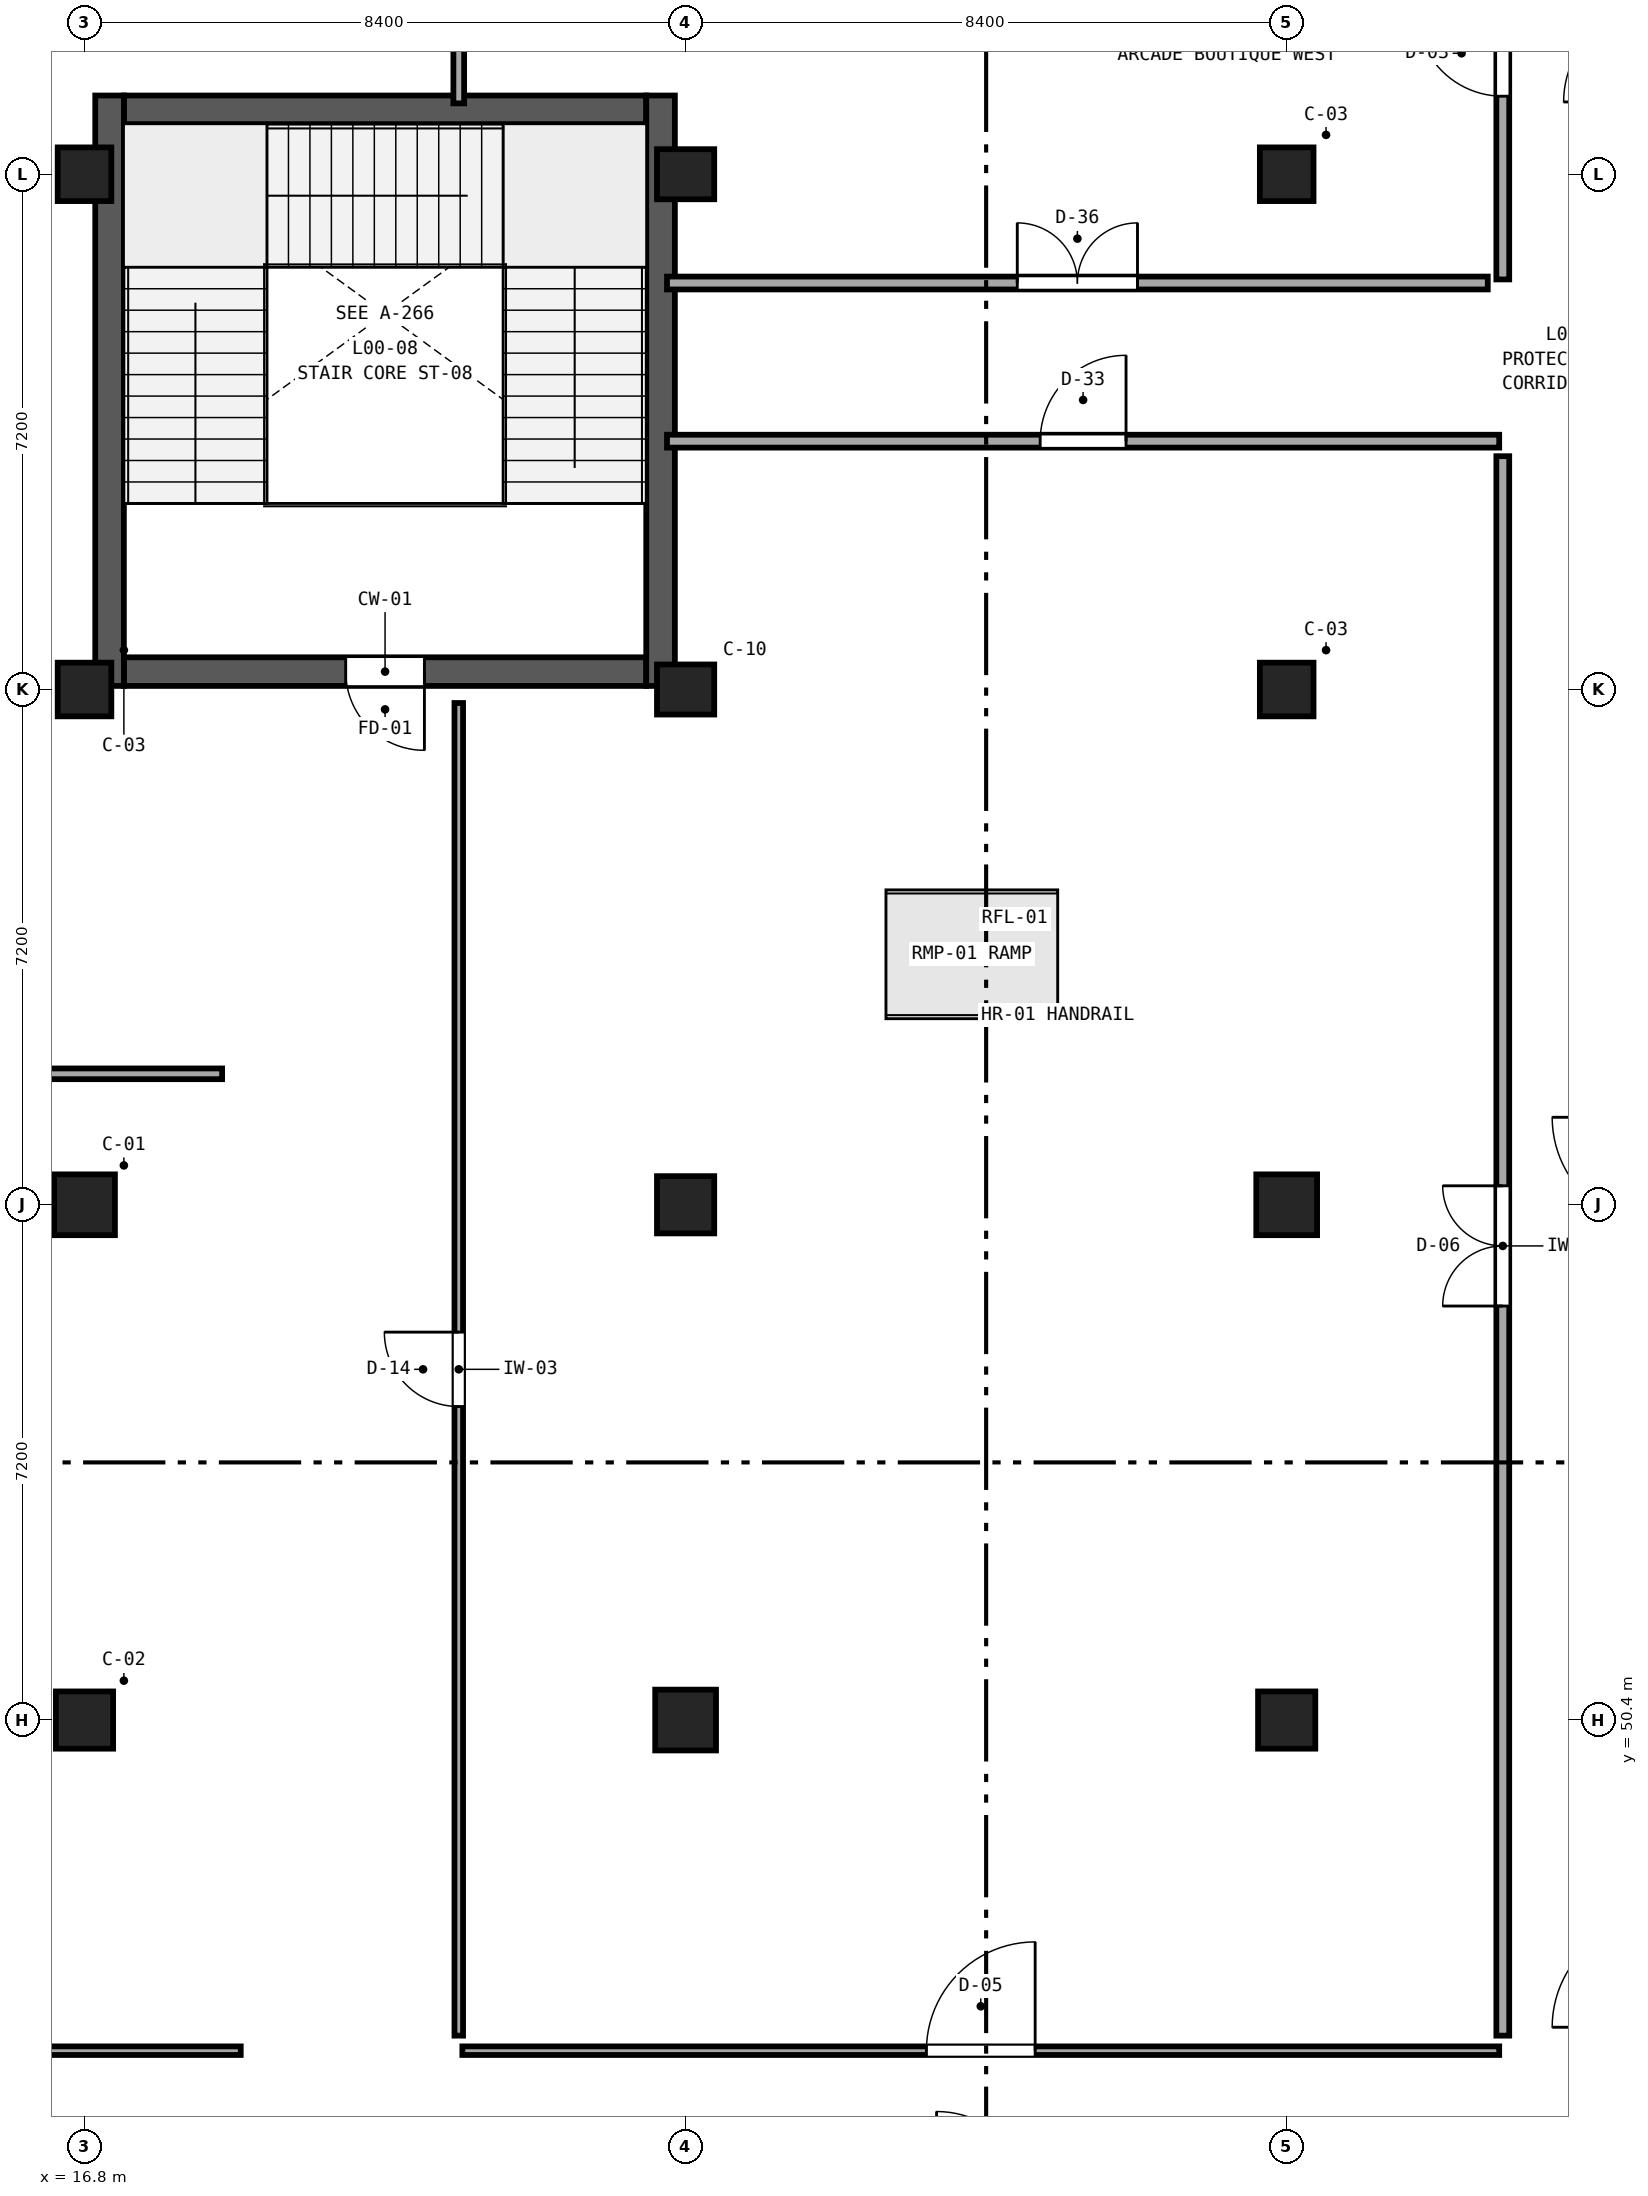
"""IFC4 building model, lengths in metres.
Left out: names, types, materials, properties, quantities, classifications, styles, units other than length and angle.
Written with IfcOpenShell. Run it as: python <this file> out.ifc"""

import sys

from ifc_helpers import new_model, si_unit, direction, frame, frame_2d, origin, origin_2d, place, context, subcontext, project, spatial, rectangle, extrude, element, fill, save


model = new_model("IFC4")
c1 = context("Model", 3, precision=1e-05, world=origin(), true_north=direction((0.0, 1.0)))
c2 = subcontext(c1, "Body", "Model", "MODEL_VIEW")
j1 = project(units=[si_unit("LENGTHUNIT", "METRE"), si_unit("PLANEANGLEUNIT", "RADIAN")], contexts=[c1])
p1 = place(None, origin())
s1 = spatial("IfcSite", under=j1, at=p1, CompositionType="ELEMENT")
p2 = place(p1, origin())
s2 = spatial("IfcBuilding", under=s1, at=p2, CompositionType="ELEMENT")
p3 = place(p2, origin())
s3 = spatial("IfcBuildingStorey", under=s2, at=p3, CompositionType="ELEMENT", Elevation=0.0)
p4 = place(p3, frame((16.8, 50.4, 0.0), z_axis=(0.0, 0.0, 1.0), x_axis=(1.0, 0.0, 0.0)))
e1 = element("IfcColumn", 1, at=p4, inside=s3, PredefinedType="COLUMN", context=c2, shape_type="SweptSolid", body=[
    extrude(rectangle(XDim=0.8, YDim=0.8, at=origin_2d()), origin(), (0.0, 0.0, 1.0), 5.4),
])
p5 = place(p3, frame((16.8, 57.6, 0.0), z_axis=(0.0, 0.0, 1.0), x_axis=(1.0, 0.0, 0.0)))
e2 = element("IfcColumn", 2, at=p5, inside=s3, PredefinedType="COLUMN", context=c2, shape_type="SweptSolid", body=[
    extrude(rectangle(XDim=0.85, YDim=0.85, at=origin_2d()), origin(), (0.0, 0.0, 1.0), 5.4),
])
for number, where, z_axis, x_axis in (
    (3, (16.8, 64.8, 0.0), (0.0, 0.0, 1.0), (1.0, 0.0, 0.0)),
    (4, (16.8, 72.0, 0.0), (0.0, 0.0, 1.0), (1.0, 0.0, 0.0)),
):
    element("IfcColumn", number, at=place(p3, frame(where, z_axis=z_axis, x_axis=x_axis)), inside=s3, PredefinedType="COLUMN", context=c2, shape_type="SweptSolid", body=[
        extrude(rectangle(XDim=0.75, YDim=0.75, at=origin_2d()), origin(), (0.0, 0.0, 1.0), 5.4),
    ])
p6 = place(p3, frame((25.2, 50.4, 0.0), z_axis=(0.0, 0.0, 1.0), x_axis=(1.0, 0.0, 0.0)))
e5 = element("IfcColumn", 5, at=p6, inside=s3, PredefinedType="COLUMN", context=c2, shape_type="SweptSolid", body=[
    extrude(rectangle(XDim=0.85, YDim=0.85, at=origin_2d()), origin(), (0.0, 0.0, 1.0), 5.4),
])
p7 = place(p3, frame((25.2, 57.6, 0.0), z_axis=(0.0, 0.0, 1.0), x_axis=(1.0, 0.0, 0.0)))
e6 = element("IfcColumn", 6, at=p7, inside=s3, PredefinedType="COLUMN", context=c2, shape_type="SweptSolid", body=[
    extrude(rectangle(XDim=0.8, YDim=0.8, at=origin_2d()), origin(), (0.0, 0.0, 1.0), 5.4),
])
for number, where, z_axis, x_axis in (
    (7, (25.2, 64.8, 0.0), (0.0, 0.0, 1.0), (1.0, 0.0, 0.0)),
    (8, (25.2, 72.0, 0.0), (0.0, 0.0, 1.0), (1.0, 0.0, 0.0)),
):
    element("IfcColumn", number, at=place(p3, frame(where, z_axis=z_axis, x_axis=x_axis)), inside=s3, PredefinedType="COLUMN", context=c2, shape_type="SweptSolid", body=[
        extrude(rectangle(XDim=0.8, YDim=0.7, at=origin_2d()), origin(), (0.0, 0.0, 1.0), 5.4),
    ])
p8 = place(p3, frame((33.6, 50.4, 0.0), z_axis=(0.0, 0.0, 1.0), x_axis=(1.0, 0.0, 0.0)))
e9 = element("IfcColumn", 9, at=p8, inside=s3, PredefinedType="COLUMN", context=c2, shape_type="SweptSolid", body=[
    extrude(rectangle(XDim=0.8, YDim=0.8, at=origin_2d()), origin(), (0.0, 0.0, 1.0), 5.4),
])
p9 = place(p3, frame((33.6, 57.6, 0.0), z_axis=(0.0, 0.0, 1.0), x_axis=(1.0, 0.0, 0.0)))
e10 = element("IfcColumn", 10, at=p9, inside=s3, PredefinedType="COLUMN", context=c2, shape_type="SweptSolid", body=[
    extrude(rectangle(XDim=0.85, YDim=0.85, at=origin_2d()), origin(), (0.0, 0.0, 1.0), 5.4),
])
for number, where, z_axis, x_axis in (
    (11, (33.6, 64.8, 0.0), (0.0, 0.0, 1.0), (1.0, 0.0, 0.0)),
    (12, (33.6, 72.0, 0.0), (0.0, 0.0, 1.0), (1.0, 0.0, 0.0)),
):
    element("IfcColumn", number, at=place(p3, frame(where, z_axis=z_axis, x_axis=x_axis)), inside=s3, PredefinedType="COLUMN", context=c2, shape_type="SweptSolid", body=[
        extrude(rectangle(XDim=0.75, YDim=0.75, at=origin_2d()), origin(), (0.0, 0.0, 1.0), 5.4),
    ])
p10 = place(p3, frame((24.65, 65.05, 0.0), z_axis=(0.0, 0.0, 1.0), x_axis=(-1.0, 0.0, 0.0)))
e13 = element("IfcWall", 13, at=p10, inside=s3, PredefinedType="SHEAR", context=c2, shape_type="SweptSolid", body=[
    extrude(rectangle(XDim=7.3, YDim=0.4, at=frame_2d((3.65, 0.0))), origin(), (0.0, 0.0, 1.0), 5.4),
])
p11 = place(p10, frame((3.1, 0.0, 0.0)))
e14 = element("IfcOpeningElement", 14, at=p11, cuts=e13, PredefinedType="OPENING", context=c2, shape_type="SweptSolid", body=[
    extrude(rectangle(XDim=1.1, YDim=2.2, at=frame_2d((0.55, 1.1))), frame((0.0, 0.22, 0.0), z_axis=(0.0, -1.0, 0.0), x_axis=(1.0, 0.0, 0.0)), (0.0, 0.0, 1.0), 0.44),
])
p12 = place(p3, frame((17.35, 72.9, 0.0), z_axis=(0.0, 0.0, 1.0), x_axis=(1.0, 0.0, 0.0)))
e15 = element("IfcWall", 15, at=p12, inside=s3, PredefinedType="SHEAR", context=c2, shape_type="SweptSolid", body=[
    extrude(rectangle(XDim=7.3, YDim=0.4, at=frame_2d((3.65, 0.0))), origin(), (0.0, 0.0, 1.0), 5.4),
])
for number, where, z_axis, x_axis in (
    (16, (17.15, 73.1, 0.0), (0.0, 0.0, 1.0), (0.0, -1.0, 0.0)),
    (17, (24.85, 64.85, 0.0), (0.0, 0.0, 1.0), (0.0, 1.0, 0.0)),
):
    element("IfcWall", number, at=place(p3, frame(where, z_axis=z_axis, x_axis=x_axis)), inside=s3, PredefinedType="SHEAR", context=c2, shape_type="SweptSolid", body=[
        extrude(rectangle(XDim=8.25, YDim=0.4, at=frame_2d((4.125, 0.0))), origin(), (0.0, 0.0, 1.0), 5.4),
    ])
p13 = place(p3, frame((36.62, 45.99, 0.0), z_axis=(0.0, 0.0, 1.0), x_axis=(0.0, 1.0, 0.0)))
e18 = element("IfcWall", 18, at=p13, inside=s3, PredefinedType="PARTITIONING", context=c2, shape_type="SweptSolid", body=[
    extrude(rectangle(XDim=22.07, YDim=0.18, at=frame_2d((11.035, 0.0))), origin(), (0.0, 0.0, 1.0), 5.08),
])
p14 = place(p13, frame((10.195, 0.0, 0.0)))
e19 = element("IfcOpeningElement", 19, at=p14, cuts=e18, PredefinedType="OPENING", context=c2, shape_type="SweptSolid", body=[
    extrude(rectangle(XDim=1.68, YDim=2.05, at=frame_2d((0.84, 1.025))), frame((0.0, 0.11, 0.0), z_axis=(0.0, -1.0, 0.0), x_axis=(1.0, 0.0, 0.0)), (0.0, 0.0, 1.0), 0.22),
])
p15 = place(p3, frame((22.03, 45.99, 0.0), z_axis=(0.0, 0.0, 1.0), x_axis=(0.0, 1.0, 0.0)))
e20 = element("IfcWall", 20, at=p15, inside=s3, PredefinedType="PARTITIONING", context=c2, shape_type="SweptSolid", body=[
    extrude(rectangle(XDim=18.621, YDim=0.12, at=frame_2d((9.311, 0.0))), origin(), (0.0, 0.0, 1.0), 5.08),
])
p16 = place(p15, frame((8.791, 0.0, 0.0)))
e21 = element("IfcOpeningElement", 21, at=p16, cuts=e20, PredefinedType="OPENING", context=c2, shape_type="SweptSolid", body=[
    extrude(rectangle(XDim=1.04, YDim=2.21, at=frame_2d((0.52, 1.105))), frame((0.0, 0.08, 0.0), z_axis=(0.0, -1.0, 0.0), x_axis=(1.0, 0.0, 0.0)), (0.0, 0.0, 1.0), 0.16),
])
p17 = place(p3, frame((0.37, 59.43, 0.0), z_axis=(0.0, 0.0, 1.0), x_axis=(1.0, 0.0, 0.0)))
e22 = element("IfcWall", 22, at=p17, inside=s3, PredefinedType="PARTITIONING", context=c2, shape_type="SweptSolid", body=[
    extrude(rectangle(XDim=18.353, YDim=0.15, at=frame_2d((9.176, 0.0))), origin(), (0.0, 0.0, 1.0), 5.08),
])
p18 = place(p17, frame((8.497, 0.0, 0.0)))
e23 = element("IfcOpeningElement", 23, at=p18, cuts=e22, PredefinedType="OPENING", context=c2, shape_type="SweptSolid", body=[
    extrude(rectangle(XDim=1.36, YDim=2.21, at=frame_2d((0.68, 1.105))), frame((0.0, 0.095, 0.0), z_axis=(0.0, -1.0, 0.0), x_axis=(1.0, 0.0, 0.0)), (0.0, 0.0, 1.0), 0.19),
])
p19 = place(p3, frame((0.73, 45.78, 0.0), z_axis=(0.0, 0.0, 1.0), x_axis=(1.0, 0.0, 0.0)))
e24 = element("IfcWall", 24, at=p19, inside=s3, PredefinedType="PARTITIONING", context=c2, shape_type="SweptSolid", body=[
    extrude(rectangle(XDim=18.253, YDim=0.12, at=frame_2d((9.126, 0.0))), origin(), (0.0, 0.0, 1.0), 5.08),
])
p20 = place(p19, frame((8.606, 0.0, 0.0)))
e25 = element("IfcOpeningElement", 25, at=p20, cuts=e24, PredefinedType="OPENING", context=c2, shape_type="SweptSolid", body=[
    extrude(rectangle(XDim=1.04, YDim=2.29, at=frame_2d((0.52, 1.145))), frame((0.0, 0.08, 0.0), z_axis=(0.0, -1.0, 0.0), x_axis=(1.0, 0.0, 0.0)), (0.0, 0.0, 1.0), 0.16),
])
p21 = place(p3, frame((22.08, 45.78, 0.0), z_axis=(0.0, 0.0, 1.0), x_axis=(1.0, 0.0, 0.0)))
e26 = element("IfcWall", 26, at=p21, inside=s3, PredefinedType="PARTITIONING", context=c2, shape_type="SweptSolid", body=[
    extrude(rectangle(XDim=14.49, YDim=0.12, at=frame_2d((7.245, 0.0))), origin(), (0.0, 0.0, 1.0), 5.08),
])
p22 = place(p21, frame((6.485, 0.0, 0.0)))
e27 = element("IfcOpeningElement", 27, at=p22, cuts=e26, PredefinedType="OPENING", context=c2, shape_type="SweptSolid", body=[
    extrude(rectangle(XDim=1.52, YDim=2.05, at=frame_2d((0.76, 1.025))), frame((0.0, 0.08, 0.0), z_axis=(0.0, -1.0, 0.0), x_axis=(1.0, 0.0, 0.0)), (0.0, 0.0, 1.0), 0.16),
])
p23 = place(p3, frame((24.94, 68.27, 0.0), z_axis=(0.0, 0.0, 1.0), x_axis=(1.0, 0.0, 0.0)))
e28 = element("IfcWall", 28, at=p23, inside=s3, PredefinedType="PARTITIONING", context=c2, shape_type="SweptSolid", body=[
    extrude(rectangle(XDim=11.63, YDim=0.18, at=frame_2d((5.815, 0.0))), origin(), (0.0, 0.0, 1.0), 5.08),
])
p24 = place(p23, frame((5.215, 0.0, 0.0)))
e29 = element("IfcOpeningElement", 29, at=p24, cuts=e28, PredefinedType="OPENING", context=c2, shape_type="SweptSolid", body=[
    extrude(rectangle(XDim=1.2, YDim=2.45, at=frame_2d((0.6, 1.225))), frame((0.0, 0.11, 0.0), z_axis=(0.0, -1.0, 0.0), x_axis=(1.0, 0.0, 0.0)), (0.0, 0.0, 1.0), 0.22),
])
p25 = place(p3, frame((24.94, 70.48, 0.0), z_axis=(0.0, 0.0, 1.0), x_axis=(1.0, 0.0, 0.0)))
e30 = element("IfcWall", 30, at=p25, inside=s3, PredefinedType="PARTITIONING", context=c2, shape_type="SweptSolid", body=[
    extrude(rectangle(XDim=11.47, YDim=0.18, at=frame_2d((5.735, 0.0))), origin(), (0.0, 0.0, 1.0), 5.08),
])
p26 = place(p25, frame((4.895, 0.0, 0.0)))
e31 = element("IfcOpeningElement", 31, at=p26, cuts=e30, PredefinedType="OPENING", context=c2, shape_type="SweptSolid", body=[
    extrude(rectangle(XDim=1.68, YDim=2.45, at=frame_2d((0.84, 1.225))), frame((0.0, 0.11, 0.0), z_axis=(0.0, -1.0, 0.0), x_axis=(1.0, 0.0, 0.0)), (0.0, 0.0, 1.0), 0.22),
])
p27 = place(p3, frame((36.62, 70.53, 0.0), z_axis=(0.0, 0.0, 1.0), x_axis=(0.0, 1.0, 0.0)))
e32 = element("IfcWall", 32, at=p27, inside=s3, PredefinedType="PARTITIONING", context=c2, shape_type="SweptSolid", body=[
    extrude(rectangle(XDim=6.32, YDim=0.18, at=frame_2d((3.16, 0.0))), origin(), (0.0, 0.0, 1.0), 5.08),
])
p28 = place(p27, frame((2.56, 0.0, 0.0)))
e33 = element("IfcOpeningElement", 33, at=p28, cuts=e32, PredefinedType="OPENING", context=c2, shape_type="SweptSolid", body=[
    extrude(rectangle(XDim=1.2, YDim=2.05, at=frame_2d((0.6, 1.025))), frame((0.0, 0.11, 0.0), z_axis=(0.0, -1.0, 0.0), x_axis=(1.0, 0.0, 0.0)), (0.0, 0.0, 1.0), 0.22),
])
p29 = place(p3, frame((22.03, 72.99, 0.0), z_axis=(0.0, 0.0, 1.0), x_axis=(0.0, 1.0, 0.0)))
e34 = element("IfcWall", 34, at=p29, inside=s3, PredefinedType="PARTITIONING", context=c2, shape_type="SweptSolid", body=[
    extrude(rectangle(XDim=3.86, YDim=0.15, at=frame_2d((1.93, 0.0))), origin(), (0.0, 0.0, 1.0), 5.08),
])
p30 = place(p29, frame((1.25, 0.0, 0.0)))
e35 = element("IfcOpeningElement", 35, at=p30, cuts=e34, PredefinedType="OPENING", context=c2, shape_type="SweptSolid", body=[
    extrude(rectangle(XDim=1.36, YDim=2.29, at=frame_2d((0.68, 1.145))), frame((0.0, 0.095, 0.0), z_axis=(0.0, -1.0, 0.0), x_axis=(1.0, 0.0, 0.0)), (0.0, 0.0, 1.0), 0.19),
])
p31 = place(p11, origin())
e36 = element("IfcDoor", 36, at=p31, inside=s3, OperationType="SINGLE_SWING_LEFT", PredefinedType="DOOR", context=c2, shape_type="SweptSolid", body=[
    extrude(rectangle(XDim=1.1, YDim=2.2, at=frame_2d((0.55, 1.1))), frame((0.0, 0.025, 0.0), z_axis=(0.0, -1.0, 0.0), x_axis=(1.0, 0.0, 0.0)), (0.0, 0.0, 1.0), 0.05),
])
fill(e14, e36)
p32 = place(p14, origin())
e37 = element("IfcDoor", 37, at=p32, inside=s3, OperationType="DOUBLE_DOOR_SINGLE_SWING", PredefinedType="DOOR", context=c2, shape_type="SweptSolid", body=[
    extrude(rectangle(XDim=1.68, YDim=2.05, at=frame_2d((0.84, 1.025))), frame((0.0, 0.025, 0.0), z_axis=(0.0, -1.0, 0.0), x_axis=(1.0, 0.0, 0.0)), (0.0, 0.0, 1.0), 0.05),
])
fill(e19, e37)
p33 = place(p16, frame((1.04, 0.0, 0.0), z_axis=(0.0, 0.0, 1.0), x_axis=(-1.0, 0.0, 0.0)))
e38 = element("IfcDoor", 38, at=p33, inside=s3, OperationType="SINGLE_SWING_RIGHT", PredefinedType="DOOR", context=c2, shape_type="SweptSolid", body=[
    extrude(rectangle(XDim=1.04, YDim=2.21, at=frame_2d((0.52, 1.105))), frame((0.0, 0.025, 0.0), z_axis=(0.0, -1.0, 0.0), x_axis=(1.0, 0.0, 0.0)), (0.0, 0.0, 1.0), 0.05),
])
fill(e21, e38)
p34 = place(p22, origin())
e39 = element("IfcDoor", 39, at=p34, inside=s3, OperationType="SINGLE_SWING_RIGHT", PredefinedType="DOOR", context=c2, shape_type="SweptSolid", body=[
    extrude(rectangle(XDim=1.52, YDim=2.05, at=frame_2d((0.76, 1.025))), frame((0.0, 0.025, 0.0), z_axis=(0.0, -1.0, 0.0), x_axis=(1.0, 0.0, 0.0)), (0.0, 0.0, 1.0), 0.05),
])
fill(e27, e39)
p35 = place(p24, frame((1.2, 0.0, 0.0), z_axis=(0.0, 0.0, 1.0), x_axis=(-1.0, 0.0, 0.0)))
e40 = element("IfcDoor", 40, at=p35, inside=s3, OperationType="SINGLE_SWING_RIGHT", PredefinedType="DOOR", context=c2, shape_type="SweptSolid", body=[
    extrude(rectangle(XDim=1.2, YDim=2.45, at=frame_2d((0.6, 1.225))), frame((0.0, 0.025, 0.0), z_axis=(0.0, -1.0, 0.0), x_axis=(1.0, 0.0, 0.0)), (0.0, 0.0, 1.0), 0.05),
])
fill(e29, e40)
p36 = place(p26, origin())
e41 = element("IfcDoor", 41, at=p36, inside=s3, OperationType="DOUBLE_DOOR_SINGLE_SWING", PredefinedType="DOOR", context=c2, shape_type="SweptSolid", body=[
    extrude(rectangle(XDim=1.68, YDim=2.45, at=frame_2d((0.84, 1.225))), frame((0.0, 0.025, 0.0), z_axis=(0.0, -1.0, 0.0), x_axis=(1.0, 0.0, 0.0)), (0.0, 0.0, 1.0), 0.05),
])
fill(e31, e41)
p37 = place(p28, origin())
e42 = element("IfcDoor", 42, at=p37, inside=s3, OperationType="SINGLE_SWING_RIGHT", PredefinedType="DOOR", context=c2, shape_type="SweptSolid", body=[
    extrude(rectangle(XDim=1.2, YDim=2.05, at=frame_2d((0.6, 1.025))), frame((0.0, 0.025, 0.0), z_axis=(0.0, -1.0, 0.0), x_axis=(1.0, 0.0, 0.0)), (0.0, 0.0, 1.0), 0.05),
])
fill(e33, e42)
save(model, sys.argv[1])
